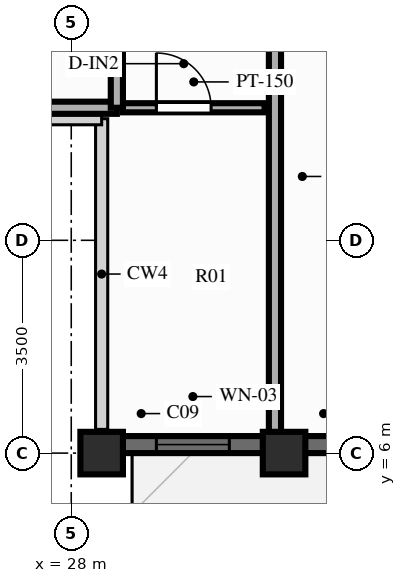
"""IFC4 building model, lengths in metres.
Left out: names, types, materials, properties, quantities, classifications, styles, units other than length and angle.
Written with IfcOpenShell. Run it as: python <this file> out.ifc"""

import sys

from ifc_helpers import new_model, si_unit, direction, frame, frame_2d, origin, origin_2d, place, context, subcontext, project, spatial, rectangle, extrude, source, transform, mapped, element, fill, save


model = new_model("IFC4")
c1 = context("Model", 3, precision=1e-05, world=origin(), true_north=direction((0.0, 1.0)))
c2 = subcontext(c1, "Body", "Model", "MODEL_VIEW")
j1 = project(units=[si_unit("LENGTHUNIT", "METRE"), si_unit("PLANEANGLEUNIT", "RADIAN")], contexts=[c1])
p1 = place(None, origin())
s1 = spatial("IfcSite", under=j1, at=p1, CompositionType="ELEMENT")
p2 = place(p1, origin())
s2 = spatial("IfcBuilding", under=s1, at=p2, CompositionType="ELEMENT")
p3 = place(p2, frame((0.0, 0.0, 246.0)))
s3 = spatial("IfcBuildingStorey", under=s2, at=p3, CompositionType="ELEMENT", Elevation=246.0)
m1 = source(origin(), c2, "Body", "SweptSolid", [
    extrude(rectangle(XDim=0.7, YDim=0.7, at=origin_2d()), origin(), (0.0, 0.0, 1.0), 3.0),
])
for number, where, z_axis, x_axis in (
    (1, (28.5, 6.0, 0.0), (0.0, 0.0, 1.0), (1.0, 0.0, 0.0)),
    (2, (31.5, 6.0, 0.0), (0.0, 0.0, 1.0), (1.0, 0.0, 0.0)),
):
    element("IfcColumn", number, at=place(p3, frame(where, z_axis=z_axis, x_axis=x_axis)), inside=s3, PredefinedType="COLUMN", context=c2, shape_type="MappedRepresentation", body=[
        mapped(m1, transform((0.0, 0.0, 0.0), scale=1.0)),
    ])
p4 = place(p3, frame((28.5, 6.14, 0.0), z_axis=(0.0, 0.0, 1.0), x_axis=(1.0, 0.0, 0.0)))
e3 = element("IfcWall", 3, at=p4, inside=s3, PredefinedType="SOLIDWALL", context=c2, shape_type="SweptSolid", body=[
    extrude(rectangle(XDim=19.0, YDim=0.28, at=frame_2d((9.5, 0.0))), origin(), (0.0, 0.0, 1.0), 2.28),
])
p5 = place(p4, frame((0.9, 0.0, 0.25)))
e4 = element("IfcOpeningElement", 4, at=p5, cuts=e3, PredefinedType="OPENING", context=c2, shape_type="SweptSolid", body=[
    extrude(rectangle(XDim=1.2, YDim=1.5, at=frame_2d((0.6, 0.75))), frame((0.0, 0.152, 0.0), z_axis=(0.0, -1.0, 0.0), x_axis=(1.0, 0.0, 0.0)), (0.0, 0.0, 1.0), 0.304),
])
p6 = place(p4, frame((6.895, 0.0, 0.0), z_axis=(0.0, 0.0, 1.0), x_axis=(-1.0, 0.0, 0.0)))
e5 = element("IfcOpeningElement", 5, at=p6, cuts=e3, PredefinedType="OPENING", context=c2, shape_type="SweptSolid", body=[
    extrude(rectangle(XDim=1.1, YDim=2.15, at=frame_2d((0.55, 1.075))), frame((0.0, 0.152, 0.0), z_axis=(0.0, -1.0, 0.0), x_axis=(1.0, 0.0, 0.0)), (0.0, 0.0, 1.0), 0.304),
])
p7 = place(p4, frame((10.8, 0.0, 0.25)))
e6 = element("IfcOpeningElement", 6, at=p7, cuts=e3, PredefinedType="OPENING", context=c2, shape_type="SweptSolid", body=[
    extrude(rectangle(XDim=1.2, YDim=1.5, at=frame_2d((0.6, 0.75))), frame((0.0, 0.152, 0.0), z_axis=(0.0, -1.0, 0.0), x_axis=(1.0, 0.0, 0.0)), (0.0, 0.0, 1.0), 0.304),
])
p8 = place(p4, frame((13.955, 0.0, 0.25)))
e7 = element("IfcOpeningElement", 7, at=p8, cuts=e3, PredefinedType="OPENING", context=c2, shape_type="SweptSolid", body=[
    extrude(rectangle(XDim=1.2, YDim=1.5, at=frame_2d((0.6, 0.75))), frame((0.0, 0.152, 0.0), z_axis=(0.0, -1.0, 0.0), x_axis=(1.0, 0.0, 0.0)), (0.0, 0.0, 1.0), 0.304),
])
p9 = place(p4, frame((16.9, 0.0, 0.25)))
e8 = element("IfcOpeningElement", 8, at=p9, cuts=e3, PredefinedType="OPENING", context=c2, shape_type="SweptSolid", body=[
    extrude(rectangle(XDim=1.2, YDim=1.5, at=frame_2d((0.6, 0.75))), frame((0.0, 0.152, 0.0), z_axis=(0.0, -1.0, 0.0), x_axis=(1.0, 0.0, 0.0)), (0.0, 0.0, 1.0), 0.304),
])
p10 = place(p3, frame((28.85, 11.68, 0.0), z_axis=(0.0, 0.0, 1.0), x_axis=(1.0, 0.0, 0.0)))
e9 = element("IfcWall", 9, at=p10, inside=s3, PredefinedType="PARTITIONING", context=c2, shape_type="SweptSolid", body=[
    extrude(rectangle(XDim=2.33, YDim=0.15, at=frame_2d((1.165, 0.0))), origin(), (0.0, 0.0, 1.0), 2.74),
])
p11 = place(p10, frame((0.55, 0.0, 0.0)))
e10 = element("IfcOpeningElement", 10, at=p11, cuts=e9, PredefinedType="OPENING", context=c2, shape_type="SweptSolid", body=[
    extrude(rectangle(XDim=0.9, YDim=2.1, at=frame_2d((0.45, 1.05))), frame((0.0, 0.087, 0.0), z_axis=(0.0, -1.0, 0.0), x_axis=(1.0, 0.0, 0.0)), (0.0, 0.0, 1.0), 0.174),
])
p12 = place(p3, frame((31.35, 14.95, 0.0), z_axis=(0.0, 0.0, 1.0), x_axis=(0.0, -1.0, 0.0)))
e11 = element("IfcWall", 11, at=p12, inside=s3, PredefinedType="PARTITIONING", context=c2, shape_type="SweptSolid", body=[
    extrude(rectangle(XDim=8.8, YDim=0.2, at=frame_2d((4.4, 0.0))), origin(), (0.0, 0.0, 1.0), 2.39),
])
p13 = place(p3, frame((28.75, 11.68, 0.0), z_axis=(0.0, 0.0, 1.0), x_axis=(-1.0, 0.0, 0.0)))
e12 = element("IfcWall", 12, at=p13, inside=s3, PredefinedType="PARTITIONING", context=c2, shape_type="SweptSolid", body=[
    extrude(rectangle(XDim=5.6, YDim=0.2, at=frame_2d((2.8, 0.0))), origin(), (0.0, 0.0, 1.0), 2.74),
])
p14 = place(p3, frame((28.75, 11.68, 0.0), z_axis=(0.0, 0.0, 1.0), x_axis=(0.0, 1.0, 0.0)))
e13 = element("IfcWall", 13, at=p14, inside=s3, PredefinedType="PARTITIONING", context=c2, shape_type="SweptSolid", body=[
    extrude(rectangle(XDim=3.983, YDim=0.2, at=frame_2d((1.992, 0.0))), origin(), (0.0, 0.0, 1.0), 2.74),
])
m2 = source(origin(), c2, "Body", "SweptSolid", [
    extrude(rectangle(XDim=1.2, YDim=1.5, at=frame_2d((0.6, 0.75))), frame((0.0, 0.03, 0.0), z_axis=(0.0, -1.0, 0.0), x_axis=(1.0, 0.0, 0.0)), (0.0, 0.0, 1.0), 0.06),
])
p15 = place(p5, origin())
e14 = element("IfcWindow", 14, at=p15, inside=s3, PartitioningType="SINGLE_PANEL", PredefinedType="WINDOW", context=c2, shape_type="MappedRepresentation", body=[
    mapped(m2, transform((0.0, 0.0, 0.0), scale=1.0)),
])
fill(e4, e14)
m3 = source(origin(), c2, "Body", "SweptSolid", [
    extrude(rectangle(XDim=0.9, YDim=2.1, at=frame_2d((0.45, 1.05))), frame((0.0, 0.025, 0.0), z_axis=(0.0, -1.0, 0.0), x_axis=(1.0, 0.0, 0.0)), (0.0, 0.0, 1.0), 0.05),
])
p16 = place(p11, origin())
e15 = element("IfcDoor", 15, at=p16, inside=s3, OperationType="SINGLE_SWING_LEFT", PredefinedType="DOOR", context=c2, shape_type="MappedRepresentation", body=[
    mapped(m3, transform((0.0, 0.0, 0.0), scale=1.0)),
])
fill(e10, e15)
save(model, sys.argv[1])
